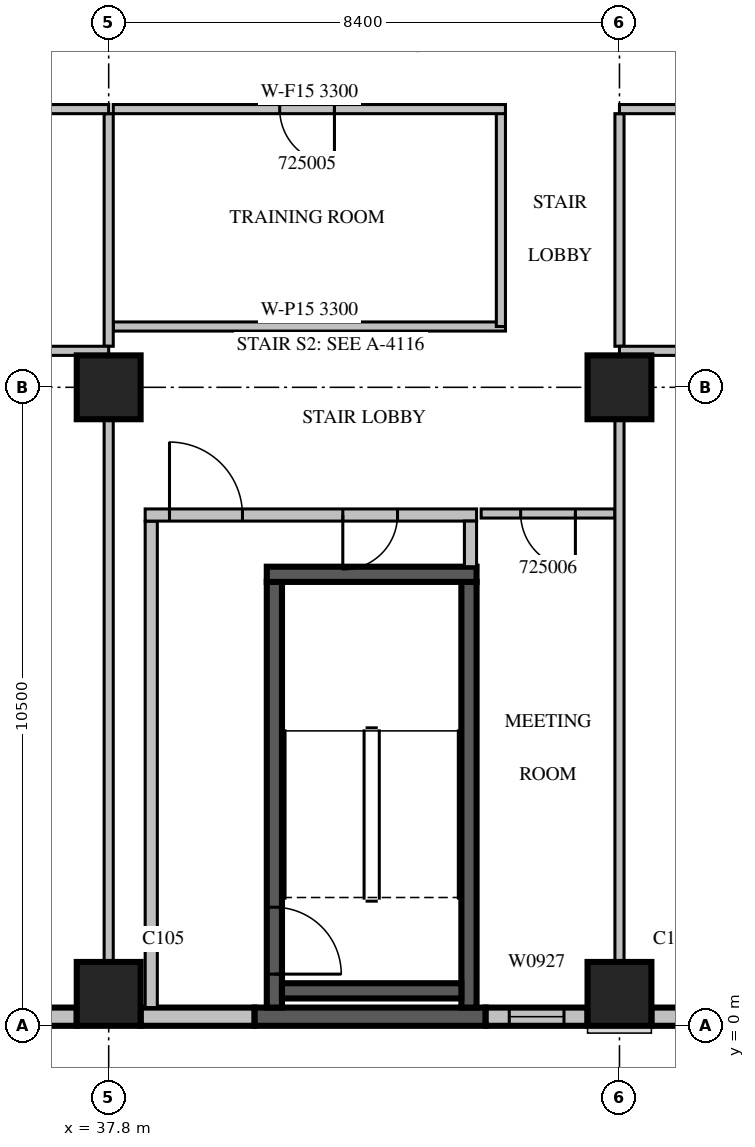
"""IFC4 building model, lengths in metres.
Left out: names, types, materials, properties, quantities, classifications, styles, units other than length and angle.
Written with IfcOpenShell. Run it as: python <this file> out.ifc"""

import sys

from ifc_helpers import new_model, si_unit, direction, frame, frame_2d, origin, origin_2d, place, context, subcontext, project, spatial, rectangle, extrude, source, transform, mapped, element, fill, save


model = new_model("IFC4")
c1 = context("Model", 3, precision=1e-05, world=origin(), true_north=direction((0.0, 1.0)))
c2 = subcontext(c1, "Body", "Model", "MODEL_VIEW")
j1 = project(units=[si_unit("LENGTHUNIT", "METRE"), si_unit("PLANEANGLEUNIT", "RADIAN")], contexts=[c1])
p1 = place(None, origin())
s1 = spatial("IfcSite", under=j1, at=p1, CompositionType="ELEMENT")
p2 = place(p1, origin())
s2 = spatial("IfcBuilding", under=s1, at=p2, CompositionType="ELEMENT")
p3 = place(p2, frame((0.0, 0.0, 116.1)))
s3 = spatial("IfcBuildingStorey", under=s2, at=p3, CompositionType="ELEMENT", Elevation=116.1)
m1 = source(origin(), c2, "Body", "SweptSolid", [
    extrude(rectangle(XDim=1.05, YDim=1.05, at=origin_2d()), origin(), (0.0, 0.0, 1.0), 4.2),
])
for number, where, z_axis, x_axis in (
    (1, (37.8, 0.525, 0.0), (0.0, 0.0, 1.0), (1.0, 0.0, 0.0)),
    (2, (46.2, 0.525, 0.0), (0.0, 0.0, 1.0), (1.0, 0.0, 0.0)),
    (3, (37.8, 10.5, 0.0), (0.0, 0.0, 1.0), (1.0, 0.0, 0.0)),
    (4, (46.2, 10.5, 0.0), (0.0, 0.0, 1.0), (1.0, 0.0, 0.0)),
):
    element("IfcColumn", number, at=place(p3, frame(where, z_axis=z_axis, x_axis=x_axis)), inside=s3, PredefinedType="COLUMN", context=c2, shape_type="MappedRepresentation", body=[
        mapped(m1, transform((0.0, 0.0, 0.0), scale=1.0)),
    ])
m2 = source(origin(), c2, "Body", "SweptSolid", [
    extrude(rectangle(XDim=7.35, YDim=0.3, at=frame_2d((3.675, 0.0))), origin(), (0.0, 0.0, 1.0), 3.8),
])
p4 = place(p3, frame((29.925, 0.15, 0.0), z_axis=(0.0, 0.0, 1.0), x_axis=(1.0, 0.0, 0.0)))
e5 = element("IfcWall", 5, at=p4, inside=s3, PredefinedType="STANDARD", context=c2, shape_type="MappedRepresentation", body=[
    mapped(m2, transform((0.0, 0.0, 0.0), scale=1.0)),
])
m3 = source(origin(), c2, "Body", "SweptSolid", [
    extrude(rectangle(XDim=1.875, YDim=0.3, at=frame_2d((0.938, 0.0))), origin(), (0.0, 0.0, 1.0), 3.8),
])
p5 = place(p3, frame((38.325, 0.15, 0.0), z_axis=(0.0, 0.0, 1.0), x_axis=(1.0, 0.0, 0.0)))
e6 = element("IfcWall", 6, at=p5, inside=s3, PredefinedType="STANDARD", context=c2, shape_type="MappedRepresentation", body=[
    mapped(m3, transform((0.0, 0.0, 0.0), scale=1.0)),
])
m4 = source(origin(), c2, "Body", "SweptSolid", [
    extrude(rectangle(XDim=3.8, YDim=0.3, at=frame_2d((1.9, 0.0))), origin(), (0.0, 0.0, 1.0), 3.8),
])
p6 = place(p3, frame((40.2, 0.15, 0.0), z_axis=(0.0, 0.0, 1.0), x_axis=(1.0, 0.0, 0.0)))
e7 = element("IfcWall", 7, at=p6, inside=s3, PredefinedType="SOLIDWALL", context=c2, shape_type="MappedRepresentation", body=[
    mapped(m4, transform((0.0, 0.0, 0.0), scale=1.0)),
])
m5 = source(origin(), c2, "Body", "SweptSolid", [
    extrude(rectangle(XDim=1.675, YDim=0.3, at=frame_2d((0.838, 0.0))), origin(), (0.0, 0.0, 1.0), 3.8),
])
p7 = place(p3, frame((44.0, 0.15, 0.0), z_axis=(0.0, 0.0, 1.0), x_axis=(1.0, 0.0, 0.0)))
e8 = element("IfcWall", 8, at=p7, inside=s3, PredefinedType="STANDARD", context=c2, shape_type="MappedRepresentation", body=[
    mapped(m5, transform((0.0, 0.0, 0.0), scale=1.0)),
])
m6 = source(origin(), c2, "Body", "SweptSolid", [
    extrude(rectangle(XDim=0.9, YDim=2.7, at=frame_2d((0.45, 1.35))), frame((0.0, 0.16, 0.0), z_axis=(0.0, -1.0, 0.0), x_axis=(1.0, 0.0, 0.0)), (0.0, 0.0, 1.0), 0.32),
])
p8 = place(p7, frame((0.388, 0.0, 0.6)))
e9 = element("IfcOpeningElement", 9, at=p8, cuts=e8, PredefinedType="OPENING", context=c2, shape_type="MappedRepresentation", body=[
    mapped(m6, transform((0.0, 0.0, 0.0), scale=1.0)),
])
m7 = source(origin(), c2, "Body", "SweptSolid", [
    extrude(rectangle(XDim=4.83, YDim=0.3, at=frame_2d((2.415, 0.0))), origin(), (0.0, 0.0, 1.0), 3.3),
])
p9 = place(p3, frame((46.725, 0.15, 0.0), z_axis=(0.0, 0.0, 1.0), x_axis=(1.0, 0.0, 0.0)))
e10 = element("IfcWall", 10, at=p9, inside=s3, PredefinedType="STANDARD", context=c2, shape_type="MappedRepresentation", body=[
    mapped(m7, transform((0.0, 0.0, 0.0), scale=1.0)),
])
m8 = source(origin(), c2, "Body", "SweptSolid", [
    extrude(rectangle(XDim=3.6, YDim=2.7, at=frame_2d((1.8, 1.35))), frame((0.0, 0.16, 0.0), z_axis=(0.0, -1.0, 0.0), x_axis=(1.0, 0.0, 0.0)), (0.0, 0.0, 1.0), 0.32),
])
p10 = place(p9, frame((0.615, 0.0, 0.6)))
e11 = element("IfcOpeningElement", 11, at=p10, cuts=e10, PredefinedType="OPENING", context=c2, shape_type="MappedRepresentation", body=[
    mapped(m8, transform((0.0, 0.0, 0.0), scale=1.0)),
])
m9 = source(origin(), c2, "Body", "SweptSolid", [
    extrude(rectangle(XDim=7.0, YDim=0.25, at=frame_2d((3.5, 0.0))), origin(), (0.0, 0.0, 1.0), 3.8),
])
p11 = place(p3, frame((40.525, 0.3, 0.0), z_axis=(0.0, 0.0, 1.0), x_axis=(0.0, 1.0, 0.0)))
e12 = element("IfcWall", 12, at=p11, inside=s3, PredefinedType="SOLIDWALL", context=c2, shape_type="MappedRepresentation", body=[
    mapped(m9, transform((0.0, 0.0, 0.0), scale=1.0)),
])
m10 = source(origin(), c2, "Body", "SweptSolid", [
    extrude(rectangle(XDim=1.1, YDim=2.1, at=frame_2d((0.55, 1.05))), frame((0.0, 0.135, 0.0), z_axis=(0.0, -1.0, 0.0), x_axis=(1.0, 0.0, 0.0)), (0.0, 0.0, 1.0), 0.27),
])
p12 = place(p11, frame((0.55, 0.0, 0.0)))
e13 = element("IfcOpeningElement", 13, at=p12, cuts=e12, PredefinedType="OPENING", context=c2, shape_type="MappedRepresentation", body=[
    mapped(m10, transform((0.0, 0.0, 0.0), scale=1.0)),
])
p13 = place(p3, frame((43.725, 0.3, 0.0), z_axis=(0.0, 0.0, 1.0), x_axis=(0.0, 1.0, 0.0)))
e14 = element("IfcWall", 14, at=p13, inside=s3, PredefinedType="SOLIDWALL", context=c2, shape_type="MappedRepresentation", body=[
    mapped(m9, transform((0.0, 0.0, 0.0), scale=1.0)),
])
m11 = source(origin(), c2, "Body", "SweptSolid", [
    extrude(rectangle(XDim=3.45, YDim=0.25, at=frame_2d((1.725, 0.0))), origin(), (0.0, 0.0, 1.0), 3.8),
])
p14 = place(p3, frame((40.4, 7.425, 0.0), z_axis=(0.0, 0.0, 1.0), x_axis=(1.0, 0.0, 0.0)))
e15 = element("IfcWall", 15, at=p14, inside=s3, PredefinedType="SOLIDWALL", context=c2, shape_type="MappedRepresentation", body=[
    mapped(m11, transform((0.0, 0.0, 0.0), scale=1.0)),
])
m12 = source(origin(), c2, "Body", "SweptSolid", [
    extrude(rectangle(XDim=2.95, YDim=0.25, at=frame_2d((1.475, 0.0))), origin(), (0.0, 0.0, 1.0), 3.8),
])
p15 = place(p3, frame((40.65, 0.575, 0.0), z_axis=(0.0, 0.0, 1.0), x_axis=(1.0, 0.0, 0.0)))
e16 = element("IfcWall", 16, at=p15, inside=s3, PredefinedType="SOLIDWALL", context=c2, shape_type="MappedRepresentation", body=[
    mapped(m12, transform((0.0, 0.0, 0.0), scale=1.0)),
])
m13 = source(origin(), c2, "Body", "SweptSolid", [
    extrude(rectangle(XDim=8.0, YDim=0.2, at=frame_2d((4.0, 0.0))), origin(), (0.0, 0.0, 1.0), 3.8),
])
p16 = place(p3, frame((38.5, 0.3, 0.0), z_axis=(0.0, 0.0, 1.0), x_axis=(0.0, 1.0, 0.0)))
e17 = element("IfcWall", 17, at=p16, inside=s3, PredefinedType="PARTITIONING", context=c2, shape_type="MappedRepresentation", body=[
    mapped(m13, transform((0.0, 0.0, 0.0), scale=1.0)),
])
m14 = source(origin(), c2, "Body", "SweptSolid", [
    extrude(rectangle(XDim=5.45, YDim=0.2, at=frame_2d((2.725, 0.0))), origin(), (0.0, 0.0, 1.0), 3.8),
])
p17 = place(p3, frame((38.4, 8.4, 0.0), z_axis=(0.0, 0.0, 1.0), x_axis=(1.0, 0.0, 0.0)))
e18 = element("IfcWall", 18, at=p17, inside=s3, PredefinedType="PARTITIONING", context=c2, shape_type="MappedRepresentation", body=[
    mapped(m14, transform((0.0, 0.0, 0.0), scale=1.0)),
])
m15 = source(origin(), c2, "Body", "SweptSolid", [
    extrude(rectangle(XDim=1.2, YDim=2.1, at=frame_2d((0.6, 1.05))), frame((0.0, 0.11, 0.0), z_axis=(0.0, -1.0, 0.0), x_axis=(1.0, 0.0, 0.0)), (0.0, 0.0, 1.0), 0.22),
])
p18 = place(p17, frame((0.4, 0.0, 0.0)))
e19 = element("IfcOpeningElement", 19, at=p18, cuts=e18, PredefinedType="OPENING", context=c2, shape_type="MappedRepresentation", body=[
    mapped(m15, transform((0.0, 0.0, 0.0), scale=1.0)),
])
m16 = source(origin(), c2, "Body", "SweptSolid", [
    extrude(rectangle(XDim=0.9, YDim=2.1, at=frame_2d((0.45, 1.05))), frame((0.0, 0.11, 0.0), z_axis=(0.0, -1.0, 0.0), x_axis=(1.0, 0.0, 0.0)), (0.0, 0.0, 1.0), 0.22),
])
p19 = place(p17, frame((3.25, 0.0, 0.0)))
e20 = element("IfcOpeningElement", 20, at=p19, cuts=e18, PredefinedType="OPENING", context=c2, shape_type="MappedRepresentation", body=[
    mapped(m16, transform((0.0, 0.0, 0.0), scale=1.0)),
])
m17 = source(origin(), c2, "Body", "SweptSolid", [
    extrude(rectangle(XDim=0.75, YDim=0.2, at=frame_2d((0.375, 0.0))), origin(), (0.0, 0.0, 1.0), 3.8),
])
p20 = place(p3, frame((43.75, 7.55, 0.0), z_axis=(0.0, 0.0, 1.0), x_axis=(0.0, 1.0, 0.0)))
e21 = element("IfcWall", 21, at=p20, inside=s3, PredefinedType="PARTITIONING", context=c2, shape_type="MappedRepresentation", body=[
    mapped(m17, transform((0.0, 0.0, 0.0), scale=1.0)),
])
m18 = source(origin(), c2, "Body", "SweptSolid", [
    extrude(rectangle(XDim=6.45, YDim=0.15, at=frame_2d((3.225, 0.0))), origin(), (0.0, 0.0, 1.0), 3.3),
])
p21 = place(p3, frame((37.875, 11.5, 0.0), z_axis=(0.0, 0.0, 1.0), x_axis=(1.0, 0.0, 0.0)))
e22 = element("IfcWall", 22, at=p21, inside=s3, PredefinedType="PARTITIONING", context=c2, shape_type="MappedRepresentation", body=[
    mapped(m18, transform((0.0, 0.0, 0.0), scale=1.0)),
])
m19 = source(origin(), c2, "Body", "SweptSolid", [
    extrude(rectangle(XDim=3.575, YDim=0.15, at=frame_2d((1.788, 0.0))), origin(), (0.0, 0.0, 1.0), 3.8),
])
p22 = place(p3, frame((44.25, 11.5, 0.0), z_axis=(0.0, 0.0, 1.0), x_axis=(0.0, 1.0, 0.0)))
e23 = element("IfcWall", 23, at=p22, inside=s3, PredefinedType="PARTITIONING", context=c2, shape_type="MappedRepresentation", body=[
    mapped(m19, transform((0.0, 0.0, 0.0), scale=1.0)),
])
p23 = place(p3, frame((44.325, 15.075, 0.0), z_axis=(0.0, 0.0, 1.0), x_axis=(-1.0, 0.0, 0.0)))
e24 = element("IfcWall", 24, at=p23, inside=s3, PredefinedType="PARTITIONING", context=c2, shape_type="MappedRepresentation", body=[
    mapped(m18, transform((0.0, 0.0, 0.0), scale=1.0)),
])
m20 = source(origin(), c2, "Body", "SweptSolid", [
    extrude(rectangle(XDim=0.9, YDim=2.1, at=frame_2d((0.45, 1.05))), frame((0.0, 0.085, 0.0), z_axis=(0.0, -1.0, 0.0), x_axis=(1.0, 0.0, 0.0)), (0.0, 0.0, 1.0), 0.17),
])
p24 = place(p23, frame((2.812, 0.0, 0.0)))
e25 = element("IfcOpeningElement", 25, at=p24, cuts=e24, PredefinedType="OPENING", context=c2, shape_type="MappedRepresentation", body=[
    mapped(m20, transform((0.0, 0.0, 0.0), scale=1.0)),
])
m21 = source(origin(), c2, "Body", "SweptSolid", [
    extrude(rectangle(XDim=2.2, YDim=0.15, at=frame_2d((1.1, 0.0))), origin(), (0.0, 0.0, 1.0), 3.8),
])
p25 = place(p3, frame((46.125, 8.425, 0.0), z_axis=(0.0, 0.0, 1.0), x_axis=(-1.0, 0.0, 0.0)))
e26 = element("IfcWall", 26, at=p25, inside=s3, PredefinedType="PARTITIONING", context=c2, shape_type="MappedRepresentation", body=[
    mapped(m21, transform((0.0, 0.0, 0.0), scale=1.0)),
])
p26 = place(p25, frame((0.65, 0.0, 0.0)))
e27 = element("IfcOpeningElement", 27, at=p26, cuts=e26, PredefinedType="OPENING", context=c2, shape_type="MappedRepresentation", body=[
    mapped(m20, transform((0.0, 0.0, 0.0), scale=1.0)),
])
m22 = source(origin(), c2, "Body", "SweptSolid", [
    extrude(rectangle(XDim=8.927, YDim=0.15, at=frame_2d((4.463, 0.0))), origin(), (0.0, 0.0, 1.0), 3.8),
])
p27 = place(p3, frame((37.8, 1.049, 0.0), z_axis=(0.0, 0.0, 1.0), x_axis=(0.0, 1.0, 0.0)))
e28 = element("IfcWall", 28, at=p27, inside=s3, PredefinedType="PARTITIONING", context=c2, shape_type="MappedRepresentation", body=[
    mapped(m22, transform((0.0, 0.0, 0.0), scale=1.0)),
])
m23 = source(origin(), c2, "Body", "SweptSolid", [
    extrude(rectangle(XDim=3.825, YDim=0.15, at=frame_2d((1.913, 0.0))), origin(), (0.0, 0.0, 1.0), 3.8),
])
p28 = place(p3, frame((37.8, 11.175, 0.0), z_axis=(0.0, 0.0, 1.0), x_axis=(0.0, 1.0, 0.0)))
e29 = element("IfcWall", 29, at=p28, inside=s3, PredefinedType="PARTITIONING", context=c2, shape_type="MappedRepresentation", body=[
    mapped(m23, transform((0.0, 0.0, 0.0), scale=1.0)),
])
m24 = source(origin(), c2, "Body", "SweptSolid", [
    extrude(rectangle(XDim=8.4, YDim=0.15, at=frame_2d((4.2, 0.0))), origin(), (0.0, 0.0, 1.0), 3.3),
])
p29 = place(p3, frame((37.8, 11.1, 0.0), z_axis=(0.0, 0.0, 1.0), x_axis=(-1.0, 0.0, 0.0)))
e30 = element("IfcWall", 30, at=p29, inside=s3, PredefinedType="PARTITIONING", context=c2, shape_type="MappedRepresentation", body=[
    mapped(m24, transform((0.0, 0.0, 0.0), scale=1.0)),
])
p30 = place(p29, frame((5.575, 0.0, 0.0)))
e31 = element("IfcOpeningElement", 31, at=p30, cuts=e30, PredefinedType="OPENING", context=c2, shape_type="MappedRepresentation", body=[
    mapped(m20, transform((0.0, 0.0, 0.0), scale=1.0)),
])
p31 = place(p29, frame((1.875, 0.0, 0.0)))
e32 = element("IfcOpeningElement", 32, at=p31, cuts=e30, PredefinedType="OPENING", context=c2, shape_type="MappedRepresentation", body=[
    mapped(m20, transform((0.0, 0.0, 0.0), scale=1.0)),
])
p32 = place(p3, frame((46.2, 1.049, 0.0), z_axis=(0.0, 0.0, 1.0), x_axis=(0.0, 1.0, 0.0)))
e33 = element("IfcWall", 33, at=p32, inside=s3, PredefinedType="PARTITIONING", context=c2, shape_type="MappedRepresentation", body=[
    mapped(m22, transform((0.0, 0.0, 0.0), scale=1.0)),
])
p33 = place(p3, frame((46.2, 11.175, 0.0), z_axis=(0.0, 0.0, 1.0), x_axis=(0.0, 1.0, 0.0)))
e34 = element("IfcWall", 34, at=p33, inside=s3, PredefinedType="PARTITIONING", context=c2, shape_type="MappedRepresentation", body=[
    mapped(m23, transform((0.0, 0.0, 0.0), scale=1.0)),
])
m25 = source(origin(), c2, "Body", "SweptSolid", [
    extrude(rectangle(XDim=24.9, YDim=0.15, at=frame_2d((12.45, 0.0))), origin(), (0.0, 0.0, 1.0), 3.8),
])
p34 = place(p3, frame((71.1, 11.1, 0.0), z_axis=(0.0, 0.0, 1.0), x_axis=(-1.0, 0.0, 0.0)))
e35 = element("IfcWall", 35, at=p34, inside=s3, PredefinedType="PARTITIONING", context=c2, shape_type="MappedRepresentation", body=[
    mapped(m25, transform((0.0, 0.0, 0.0), scale=1.0)),
])
m26 = source(origin(), c2, "Body", "SweptSolid", [
    extrude(rectangle(XDim=1.1, YDim=2.1, at=frame_2d((0.55, 1.05))), frame((0.0, 0.085, 0.0), z_axis=(0.0, -1.0, 0.0), x_axis=(1.0, 0.0, 0.0)), (0.0, 0.0, 1.0), 0.17),
])
p35 = place(p34, frame((14.493, 0.0, 0.0)))
e36 = element("IfcOpeningElement", 36, at=p35, cuts=e35, PredefinedType="OPENING", context=c2, shape_type="MappedRepresentation", body=[
    mapped(m26, transform((0.0, 0.0, 0.0), scale=1.0)),
])
p36 = place(p34, frame((10.614, 0.0, 0.0)))
e37 = element("IfcOpeningElement", 37, at=p36, cuts=e35, PredefinedType="OPENING", context=c2, shape_type="MappedRepresentation", body=[
    mapped(m26, transform((0.0, 0.0, 0.0), scale=1.0)),
])
p37 = place(p3, frame((37.8, 15.075, 0.0), z_axis=(0.0, 0.0, 1.0), x_axis=(-1.0, 0.0, 0.0)))
e38 = element("IfcWall", 38, at=p37, inside=s3, PredefinedType="PARTITIONING", context=c2, shape_type="MappedRepresentation", body=[
    mapped(m24, transform((0.0, 0.0, 0.0), scale=1.0)),
])
m27 = source(origin(), c2, "Body", "SweptSolid", [
    extrude(rectangle(XDim=1.2, YDim=2.1, at=frame_2d((0.6, 1.05))), frame((0.0, 0.085, 0.0), z_axis=(0.0, -1.0, 0.0), x_axis=(1.0, 0.0, 0.0)), (0.0, 0.0, 1.0), 0.17),
])
p38 = place(p37, frame((3.6, 0.0, 0.0)))
e39 = element("IfcOpeningElement", 39, at=p38, cuts=e38, PredefinedType="OPENING", context=c2, shape_type="MappedRepresentation", body=[
    mapped(m27, transform((0.0, 0.0, 0.0), scale=1.0)),
])
p39 = place(p3, frame((71.1, 15.075, 0.0), z_axis=(0.0, 0.0, 1.0), x_axis=(-1.0, 0.0, 0.0)))
e40 = element("IfcWall", 40, at=p39, inside=s3, PredefinedType="PARTITIONING", context=c2, shape_type="MappedRepresentation", body=[
    mapped(m25, transform((0.0, 0.0, 0.0), scale=1.0)),
])
p40 = place(p39, frame((14.266, 0.0, 0.0)))
e41 = element("IfcOpeningElement", 41, at=p40, cuts=e40, PredefinedType="OPENING", context=c2, shape_type="MappedRepresentation", body=[
    mapped(m26, transform((0.0, 0.0, 0.0), scale=1.0)),
])
p41 = place(p39, frame((21.51, 0.0, 0.0)))
e42 = element("IfcOpeningElement", 42, at=p41, cuts=e40, PredefinedType="OPENING", context=c2, shape_type="MappedRepresentation", body=[
    mapped(m20, transform((0.0, 0.0, 0.0), scale=1.0)),
])
p42 = place(p39, frame((17.306, 0.0, 0.0)))
e43 = element("IfcOpeningElement", 43, at=p42, cuts=e40, PredefinedType="OPENING", context=c2, shape_type="MappedRepresentation", body=[
    mapped(m20, transform((0.0, 0.0, 0.0), scale=1.0)),
])
p43 = place(p39, frame((10.889, 0.0, 0.0)))
e44 = element("IfcOpeningElement", 44, at=p43, cuts=e40, PredefinedType="OPENING", context=c2, shape_type="MappedRepresentation", body=[
    mapped(m26, transform((0.0, 0.0, 0.0), scale=1.0)),
])
p44 = place(p39, frame((8.05, 0.0, 0.0)))
e45 = element("IfcOpeningElement", 45, at=p44, cuts=e40, PredefinedType="OPENING", context=c2, shape_type="MappedRepresentation", body=[
    mapped(m20, transform((0.0, 0.0, 0.0), scale=1.0)),
])
p45 = place(p39, frame((5.108, 0.0, 0.0)))
e46 = element("IfcOpeningElement", 46, at=p45, cuts=e40, PredefinedType="OPENING", context=c2, shape_type="MappedRepresentation", body=[
    mapped(m20, transform((0.0, 0.0, 0.0), scale=1.0)),
])
p46 = place(p39, frame((2.27, 0.0, 0.0)))
e47 = element("IfcOpeningElement", 47, at=p46, cuts=e40, PredefinedType="OPENING", context=c2, shape_type="MappedRepresentation", body=[
    mapped(m20, transform((0.0, 0.0, 0.0), scale=1.0)),
])
p47 = place(p39, frame((0.305, 0.0, 0.0)))
e48 = element("IfcOpeningElement", 48, at=p47, cuts=e40, PredefinedType="OPENING", context=c2, shape_type="MappedRepresentation", body=[
    mapped(m20, transform((0.0, 0.0, 0.0), scale=1.0)),
])
m28 = source(origin(), c2, "Body", "SweptSolid", [
    extrude(rectangle(XDim=0.9, YDim=2.7, at=frame_2d((0.45, 1.35))), frame((0.0, 0.03, 0.0), z_axis=(0.0, -1.0, 0.0), x_axis=(1.0, 0.0, 0.0)), (0.0, 0.0, 1.0), 0.06),
])
p48 = place(p8, origin())
e49 = element("IfcWindow", 49, at=p48, inside=s3, PartitioningType="SINGLE_PANEL", PredefinedType="WINDOW", context=c2, shape_type="MappedRepresentation", body=[
    mapped(m28, transform((0.0, 0.0, 0.0), scale=1.0)),
])
fill(e9, e49)
m29 = source(origin(), c2, "Body", "SweptSolid", [
    extrude(rectangle(XDim=1.1, YDim=2.1, at=frame_2d((0.55, 1.05))), frame((0.0, 0.025, 0.0), z_axis=(0.0, -1.0, 0.0), x_axis=(1.0, 0.0, 0.0)), (0.0, 0.0, 1.0), 0.05),
])
p49 = place(p12, origin())
e50 = element("IfcDoor", 50, at=p49, inside=s3, OperationType="SINGLE_SWING_RIGHT", PredefinedType="DOOR", context=c2, shape_type="MappedRepresentation", body=[
    mapped(m29, transform((0.0, 0.0, 0.0), scale=1.0)),
])
fill(e13, e50)
m30 = source(origin(), c2, "Body", "SweptSolid", [
    extrude(rectangle(XDim=1.2, YDim=2.1, at=frame_2d((0.6, 1.05))), frame((0.0, 0.025, 0.0), z_axis=(0.0, -1.0, 0.0), x_axis=(1.0, 0.0, 0.0)), (0.0, 0.0, 1.0), 0.05),
])
p50 = place(p18, origin())
e51 = element("IfcDoor", 51, at=p50, inside=s3, OperationType="SINGLE_SWING_LEFT", PredefinedType="DOOR", context=c2, shape_type="MappedRepresentation", body=[
    mapped(m30, transform((0.0, 0.0, 0.0), scale=1.0)),
])
fill(e19, e51)
m31 = source(origin(), c2, "Body", "SweptSolid", [
    extrude(rectangle(XDim=0.9, YDim=2.1, at=frame_2d((0.45, 1.05))), frame((0.0, 0.025, 0.0), z_axis=(0.0, -1.0, 0.0), x_axis=(1.0, 0.0, 0.0)), (0.0, 0.0, 1.0), 0.05),
])
p51 = place(p19, origin())
e52 = element("IfcDoor", 52, at=p51, inside=s3, OperationType="SINGLE_SWING_RIGHT", PredefinedType="DOOR", context=c2, shape_type="MappedRepresentation", body=[
    mapped(m31, transform((0.0, 0.0, 0.0), scale=1.0)),
])
fill(e20, e52)
p52 = place(p24, origin())
e53 = element("IfcDoor", 53, at=p52, inside=s3, OperationType="SINGLE_SWING_LEFT", PredefinedType="DOOR", context=c2, shape_type="MappedRepresentation", body=[
    mapped(m31, transform((0.0, 0.0, 0.0), scale=1.0)),
])
fill(e25, e53)
p53 = place(p26, origin())
e54 = element("IfcDoor", 54, at=p53, inside=s3, OperationType="SINGLE_SWING_LEFT", PredefinedType="DOOR", context=c2, shape_type="MappedRepresentation", body=[
    mapped(m31, transform((0.0, 0.0, 0.0), scale=1.0)),
])
fill(e27, e54)
save(model, sys.argv[1])
